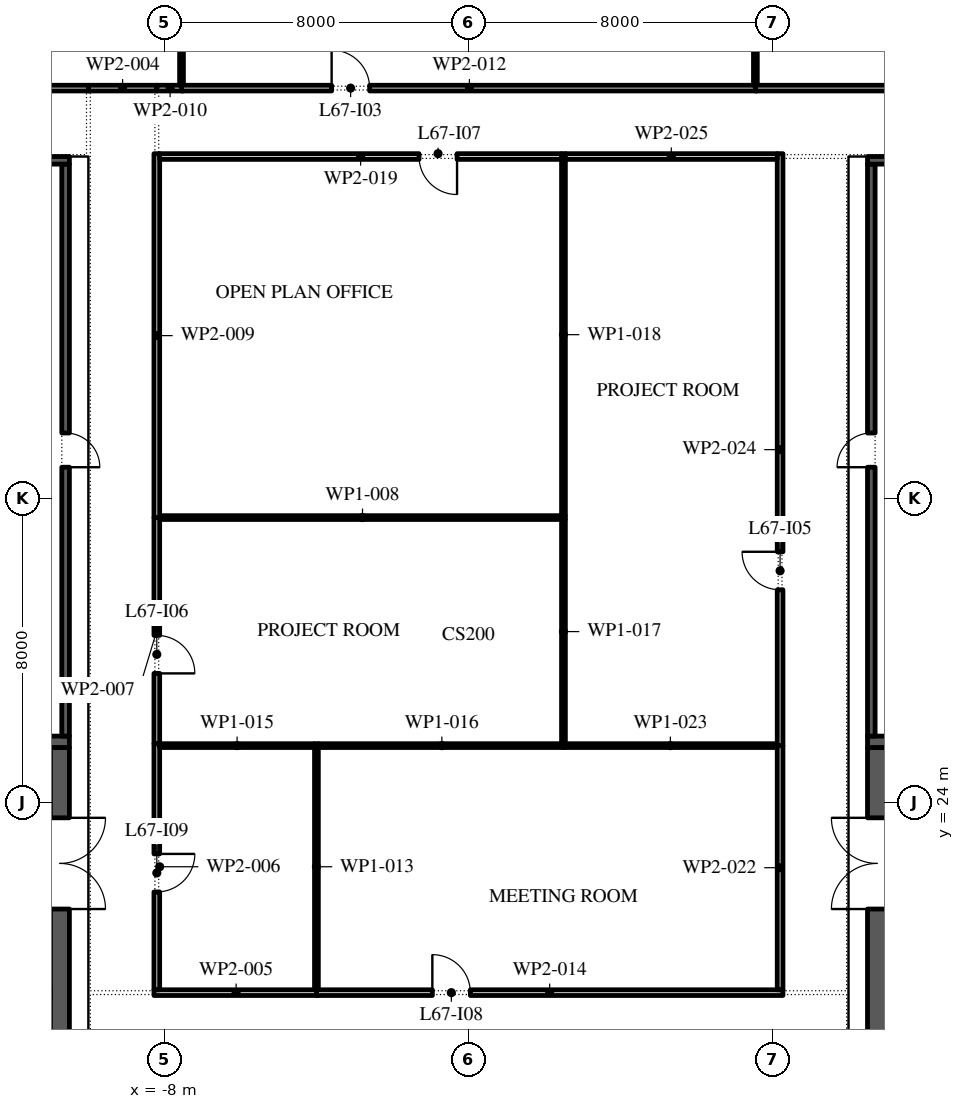
"""IFC4 building model, lengths in metres.
Left out: names, types, materials, properties, quantities, classifications, styles, units other than length and angle.
Written with IfcOpenShell. Run it as: python <this file> out.ifc"""

import sys

from ifc_helpers import new_model, si_unit, direction, frame, frame_2d, origin, place, context, subcontext, project, spatial, rectangle, extrude, element, fill, save


model = new_model("IFC4")
c1 = context("Model", 3, precision=1e-05, world=origin(), true_north=direction((0.0, 1.0)))
c2 = subcontext(c1, "Body", "Model", "MODEL_VIEW")
j1 = project(units=[si_unit("LENGTHUNIT", "METRE"), si_unit("PLANEANGLEUNIT", "RADIAN")], contexts=[c1])
p1 = place(None, origin())
s1 = spatial("IfcSite", under=j1, at=p1, CompositionType="ELEMENT")
p2 = place(p1, origin())
s2 = spatial("IfcBuilding", under=s1, at=p2, CompositionType="ELEMENT")
p3 = place(p2, frame((0.0, 0.0, 309.0)))
s3 = spatial("IfcBuildingStorey", under=s2, at=p3, CompositionType="ELEMENT", Elevation=309.0)
p4 = place(p3, frame((-10.75, -2.45, 0.0), z_axis=(0.0, 0.0, 1.0), x_axis=(0.0, 1.0, 0.0)))
e1 = element("IfcWall", 1, at=p4, inside=s3, PredefinedType="SHEAR", context=c2, shape_type="SweptSolid", body=[
    extrude(rectangle(XDim=27.9, YDim=0.5, at=frame_2d((13.95, 0.0))), origin(), (0.0, 0.0, 1.0), 4.0),
])
p5 = place(p4, frame((23.65, 0.0, 0.0)))
e2 = element("IfcOpeningElement", 2, at=p5, cuts=e1, PredefinedType="OPENING", context=c2, shape_type="SweptSolid", body=[
    extrude(rectangle(XDim=2.4, YDim=2.1, at=frame_2d((1.2, 1.05))), frame((0.0, 0.26, 0.0), z_axis=(0.0, -1.0, 0.0), x_axis=(1.0, 0.0, 0.0)), (0.0, 0.0, 1.0), 0.52),
])
p6 = place(p4, frame((0.788, 0.0, 0.0)))
e3 = element("IfcOpeningElement", 3, at=p6, cuts=e1, PredefinedType="OPENING", context=c2, shape_type="SweptSolid", body=[
    extrude(rectangle(XDim=0.9, YDim=2.1, at=frame_2d((0.45, 1.05))), frame((0.0, 0.26, 0.0), z_axis=(0.0, -1.0, 0.0), x_axis=(1.0, 0.0, 0.0)), (0.0, 0.0, 1.0), 0.52),
])
p7 = place(p4, frame((3.962, 0.0, 0.0)))
e4 = element("IfcOpeningElement", 4, at=p7, cuts=e1, PredefinedType="OPENING", context=c2, shape_type="SweptSolid", body=[
    extrude(rectangle(XDim=1.0, YDim=2.1, at=frame_2d((0.5, 1.05))), frame((0.0, 0.26, 0.0), z_axis=(0.0, -1.0, 0.0), x_axis=(1.0, 0.0, 0.0)), (0.0, 0.0, 1.0), 0.52),
])
p8 = place(p3, frame((-21.5, 25.6, 0.0), z_axis=(0.0, 0.0, 1.0), x_axis=(1.0, 0.0, 0.0)))
e5 = element("IfcWall", 5, at=p8, inside=s3, PredefinedType="SHEAR", context=c2, shape_type="SweptSolid", body=[
    extrude(rectangle(XDim=11.0, YDim=0.3, at=frame_2d((5.5, 0.0))), origin(), (0.0, 0.0, 1.0), 4.0),
])
p9 = place(p3, frame((-10.6, 25.75, 0.0), z_axis=(0.0, 0.0, 1.0), x_axis=(0.0, 1.0, 0.0)))
e6 = element("IfcWall", 6, at=p9, inside=s3, PredefinedType="SHEAR", context=c2, shape_type="SweptSolid", body=[
    extrude(rectangle(XDim=15.05, YDim=0.2, at=frame_2d((7.525, 0.0))), origin(), (0.0, 0.0, 1.0), 4.0),
])
p10 = place(p9, frame((7.075, 0.0, 0.0)))
e7 = element("IfcOpeningElement", 7, at=p10, cuts=e6, PredefinedType="OPENING", context=c2, shape_type="SweptSolid", body=[
    extrude(rectangle(XDim=0.9, YDim=2.1, at=frame_2d((0.45, 1.05))), frame((0.0, 0.11, 0.0), z_axis=(0.0, -1.0, 0.0), x_axis=(1.0, 0.0, 0.0)), (0.0, 0.0, 1.0), 0.22),
])
p11 = place(p3, frame((-21.5, 40.9, 0.0), z_axis=(0.0, 0.0, 1.0), x_axis=(1.0, 0.0, 0.0)))
e8 = element("IfcWall", 8, at=p11, inside=s3, PredefinedType="SHEAR", context=c2, shape_type="SweptSolid", body=[
    extrude(rectangle(XDim=11.0, YDim=0.2, at=frame_2d((5.5, 0.0))), origin(), (0.0, 0.0, 1.0), 4.0),
])
p12 = place(p3, frame((10.75, -2.45, 0.0), z_axis=(0.0, 0.0, 1.0), x_axis=(0.0, 1.0, 0.0)))
e9 = element("IfcWall", 9, at=p12, inside=s3, PredefinedType="SHEAR", context=c2, shape_type="SweptSolid", body=[
    extrude(rectangle(XDim=27.9, YDim=0.5, at=frame_2d((13.95, 0.0))), origin(), (0.0, 0.0, 1.0), 4.0),
])
p13 = place(p12, frame((23.65, 0.0, 0.0)))
e10 = element("IfcOpeningElement", 10, at=p13, cuts=e9, PredefinedType="OPENING", context=c2, shape_type="SweptSolid", body=[
    extrude(rectangle(XDim=2.4, YDim=2.1, at=frame_2d((1.2, 1.05))), frame((0.0, 0.26, 0.0), z_axis=(0.0, -1.0, 0.0), x_axis=(1.0, 0.0, 0.0)), (0.0, 0.0, 1.0), 0.52),
])
p14 = place(p12, frame((1.387, 0.0, 0.0)))
e11 = element("IfcOpeningElement", 11, at=p14, cuts=e9, PredefinedType="OPENING", context=c2, shape_type="SweptSolid", body=[
    extrude(rectangle(XDim=0.9, YDim=2.1, at=frame_2d((0.45, 1.05))), frame((0.0, 0.26, 0.0), z_axis=(0.0, -1.0, 0.0), x_axis=(1.0, 0.0, 0.0)), (0.0, 0.0, 1.0), 0.52),
])
p15 = place(p12, frame((4.562, 0.0, 0.0)))
e12 = element("IfcOpeningElement", 12, at=p15, cuts=e9, PredefinedType="OPENING", context=c2, shape_type="SweptSolid", body=[
    extrude(rectangle(XDim=1.0, YDim=2.1, at=frame_2d((0.5, 1.05))), frame((0.0, 0.26, 0.0), z_axis=(0.0, -1.0, 0.0), x_axis=(1.0, 0.0, 0.0)), (0.0, 0.0, 1.0), 0.52),
])
p16 = place(p3, frame((10.5, 25.6, 0.0), z_axis=(0.0, 0.0, 1.0), x_axis=(1.0, 0.0, 0.0)))
e13 = element("IfcWall", 13, at=p16, inside=s3, PredefinedType="SHEAR", context=c2, shape_type="SweptSolid", body=[
    extrude(rectangle(XDim=11.0, YDim=0.3, at=frame_2d((5.5, 0.0))), origin(), (0.0, 0.0, 1.0), 4.0),
])
p17 = place(p3, frame((10.6, 25.75, 0.0), z_axis=(0.0, 0.0, 1.0), x_axis=(0.0, 1.0, 0.0)))
e14 = element("IfcWall", 14, at=p17, inside=s3, PredefinedType="SHEAR", context=c2, shape_type="SweptSolid", body=[
    extrude(rectangle(XDim=15.05, YDim=0.2, at=frame_2d((7.525, 0.0))), origin(), (0.0, 0.0, 1.0), 4.0),
])
p18 = place(p17, frame((7.075, 0.0, 0.0)))
e15 = element("IfcOpeningElement", 15, at=p18, cuts=e14, PredefinedType="OPENING", context=c2, shape_type="SweptSolid", body=[
    extrude(rectangle(XDim=0.9, YDim=2.1, at=frame_2d((0.45, 1.05))), frame((0.0, 0.11, 0.0), z_axis=(0.0, -1.0, 0.0), x_axis=(1.0, 0.0, 0.0)), (0.0, 0.0, 1.0), 0.22),
])
p19 = place(p3, frame((10.5, 40.9, 0.0), z_axis=(0.0, 0.0, 1.0), x_axis=(1.0, 0.0, 0.0)))
e16 = element("IfcWall", 16, at=p19, inside=s3, PredefinedType="SHEAR", context=c2, shape_type="SweptSolid", body=[
    extrude(rectangle(XDim=11.0, YDim=0.2, at=frame_2d((5.5, 0.0))), origin(), (0.0, 0.0, 1.0), 4.0),
])
p20 = place(p3, frame((-26.05, 42.8, 0.0), z_axis=(0.0, 0.0, 1.0), x_axis=(1.0, 0.0, 0.0)))
e17 = element("IfcWall", 17, at=p20, inside=s3, PredefinedType="PARTITIONING", context=c2, shape_type="SweptSolid", body=[
    extrude(rectangle(XDim=16.05, YDim=0.15, at=frame_2d((8.025, 0.0))), origin(), (0.0, 0.0, 1.0), 4.0),
])
p21 = place(p20, frame((4.15, 0.0, 0.0)))
e18 = element("IfcOpeningElement", 18, at=p21, cuts=e17, PredefinedType="OPENING", context=c2, shape_type="SweptSolid", body=[
    extrude(rectangle(XDim=1.0, YDim=2.1, at=frame_2d((0.5, 1.05))), frame((0.0, 0.085, 0.0), z_axis=(0.0, -1.0, 0.0), x_axis=(1.0, 0.0, 0.0)), (0.0, 0.0, 1.0), 0.17),
])
p22 = place(p3, frame((-10.0, 42.8, 0.0), z_axis=(0.0, 0.0, 1.0), x_axis=(1.0, 0.0, 0.0)))
e19 = element("IfcWall", 19, at=p22, inside=s3, PredefinedType="PARTITIONING", context=c2, shape_type="SweptSolid", body=[
    extrude(rectangle(XDim=1.8, YDim=0.15, at=frame_2d((0.9, 0.0))), origin(), (0.0, 0.0, 1.0), 4.0),
])
p23 = place(p3, frame((-8.275, 19.0, 0.0), z_axis=(0.0, 0.0, 1.0), x_axis=(1.0, 0.0, 0.0)))
e20 = element("IfcWall", 20, at=p23, inside=s3, PredefinedType="PARTITIONING", context=c2, shape_type="SweptSolid", body=[
    extrude(rectangle(XDim=4.325, YDim=0.15, at=frame_2d((2.163, 0.0))), origin(), (0.0, 0.0, 1.0), 4.0),
])
p24 = place(p3, frame((-8.2, 25.55, 0.0), z_axis=(0.0, 0.0, 1.0), x_axis=(0.0, -1.0, 0.0)))
e21 = element("IfcWall", 21, at=p24, inside=s3, PredefinedType="PARTITIONING", context=c2, shape_type="SweptSolid", body=[
    extrude(rectangle(XDim=6.475, YDim=0.15, at=frame_2d((3.238, 0.0))), origin(), (0.0, 0.0, 1.0), 4.0),
])
p25 = place(p24, frame((2.9, 0.0, 0.0)))
e22 = element("IfcOpeningElement", 22, at=p25, cuts=e21, PredefinedType="OPENING", context=c2, shape_type="SweptSolid", body=[
    extrude(rectangle(XDim=1.0, YDim=2.1, at=frame_2d((0.5, 1.05))), frame((0.0, 0.085, 0.0), z_axis=(0.0, -1.0, 0.0), x_axis=(1.0, 0.0, 0.0)), (0.0, 0.0, 1.0), 0.17),
])
p26 = place(p3, frame((-8.2, 31.5, 0.0), z_axis=(0.0, 0.0, 1.0), x_axis=(0.0, -1.0, 0.0)))
e23 = element("IfcWall", 23, at=p26, inside=s3, PredefinedType="PARTITIONING", context=c2, shape_type="SweptSolid", body=[
    extrude(rectangle(XDim=5.95, YDim=0.15, at=frame_2d((2.975, 0.0))), origin(), (0.0, 0.0, 1.0), 4.0),
])
p27 = place(p26, frame((3.1, 0.0, 0.0)))
e24 = element("IfcOpeningElement", 24, at=p27, cuts=e23, PredefinedType="OPENING", context=c2, shape_type="SweptSolid", body=[
    extrude(rectangle(XDim=1.0, YDim=2.1, at=frame_2d((0.5, 1.05))), frame((0.0, 0.085, 0.0), z_axis=(0.0, -1.0, 0.0), x_axis=(1.0, 0.0, 0.0)), (0.0, 0.0, 1.0), 0.17),
])
p28 = place(p3, frame((-8.125, 31.5, 0.0), z_axis=(0.0, 0.0, 1.0), x_axis=(1.0, 0.0, 0.0)))
e25 = element("IfcWall", 25, at=p28, inside=s3, PredefinedType="PARTITIONING", context=c2, shape_type="SweptSolid", body=[
    extrude(rectangle(XDim=10.675, YDim=0.1, at=frame_2d((5.337, 0.0))), origin(), (0.0, 0.0, 1.0), 4.0),
])
p29 = place(p3, frame((-8.2, 41.075, 0.0), z_axis=(0.0, 0.0, 1.0), x_axis=(0.0, -1.0, 0.0)))
e26 = element("IfcWall", 26, at=p29, inside=s3, PredefinedType="PARTITIONING", context=c2, shape_type="SweptSolid", body=[
    extrude(rectangle(XDim=9.575, YDim=0.15, at=frame_2d((4.788, 0.0))), origin(), (0.0, 0.0, 1.0), 4.0),
])
p30 = place(p3, frame((-8.2, 42.8, 0.0), z_axis=(0.0, 0.0, 1.0), x_axis=(1.0, 0.0, 0.0)))
e27 = element("IfcWall", 27, at=p30, inside=s3, PredefinedType="PARTITIONING", context=c2, shape_type="SweptSolid", body=[
    extrude(rectangle(XDim=0.7, YDim=0.15, at=frame_2d((0.35, 0.0))), origin(), (0.0, 0.0, 1.0), 4.0),
])
p31 = place(p3, frame((-7.55, 42.875, 0.0), z_axis=(0.0, 0.0, 1.0), x_axis=(0.0, 1.0, 0.0)))
e28 = element("IfcWall", 28, at=p31, inside=s3, PredefinedType="PARTITIONING", context=c2, shape_type="SweptSolid", body=[
    extrude(rectangle(XDim=9.925, YDim=0.1, at=frame_2d((4.962, 0.0))), origin(), (0.0, 0.0, 1.0), 4.0),
])
p32 = place(p3, frame((-7.55, 42.8, 0.0), z_axis=(0.0, 0.0, 1.0), x_axis=(1.0, 0.0, 0.0)))
e29 = element("IfcWall", 29, at=p32, inside=s3, PredefinedType="PARTITIONING", context=c2, shape_type="SweptSolid", body=[
    extrude(rectangle(XDim=15.15, YDim=0.15, at=frame_2d((7.575, 0.0))), origin(), (0.0, 0.0, 1.0), 4.0),
])
p33 = place(p32, frame((3.95, 0.0, 0.0)))
e30 = element("IfcOpeningElement", 30, at=p33, cuts=e29, PredefinedType="OPENING", context=c2, shape_type="SweptSolid", body=[
    extrude(rectangle(XDim=1.0, YDim=2.1, at=frame_2d((0.5, 1.05))), frame((0.0, 0.085, 0.0), z_axis=(0.0, -1.0, 0.0), x_axis=(1.0, 0.0, 0.0)), (0.0, 0.0, 1.0), 0.17),
])
p34 = place(p3, frame((-4.0, 19.075, 0.0), z_axis=(0.0, 0.0, 1.0), x_axis=(0.0, 1.0, 0.0)))
e31 = element("IfcWall", 31, at=p34, inside=s3, PredefinedType="PARTITIONING", context=c2, shape_type="SweptSolid", body=[
    extrude(rectangle(XDim=6.475, YDim=0.1, at=frame_2d((3.238, 0.0))), origin(), (0.0, 0.0, 1.0), 4.0),
])
p35 = place(p3, frame((-4.0, 19.0, 0.0), z_axis=(0.0, 0.0, 1.0), x_axis=(1.0, 0.0, 0.0)))
e32 = element("IfcWall", 32, at=p35, inside=s3, PredefinedType="PARTITIONING", context=c2, shape_type="SweptSolid", body=[
    extrude(rectangle(XDim=12.275, YDim=0.15, at=frame_2d((6.137, 0.0))), origin(), (0.0, 0.0, 1.0), 4.0),
])
p36 = place(p35, frame((3.05, 0.0, 0.0)))
e33 = element("IfcOpeningElement", 33, at=p36, cuts=e32, PredefinedType="OPENING", context=c2, shape_type="SweptSolid", body=[
    extrude(rectangle(XDim=1.0, YDim=2.1, at=frame_2d((0.5, 1.05))), frame((0.0, 0.085, 0.0), z_axis=(0.0, -1.0, 0.0), x_axis=(1.0, 0.0, 0.0)), (0.0, 0.0, 1.0), 0.17),
])
p37 = place(p3, frame((-4.05, 25.5, 0.0), z_axis=(0.0, 0.0, 1.0), x_axis=(-1.0, 0.0, 0.0)))
e34 = element("IfcWall", 34, at=p37, inside=s3, PredefinedType="PARTITIONING", context=c2, shape_type="SweptSolid", body=[
    extrude(rectangle(XDim=4.075, YDim=0.1, at=frame_2d((2.038, 0.0))), origin(), (0.0, 0.0, 1.0), 4.0),
])
p38 = place(p3, frame((2.55, 25.5, 0.0), z_axis=(0.0, 0.0, 1.0), x_axis=(-1.0, 0.0, 0.0)))
e35 = element("IfcWall", 35, at=p38, inside=s3, PredefinedType="PARTITIONING", context=c2, shape_type="SweptSolid", body=[
    extrude(rectangle(XDim=6.5, YDim=0.1, at=frame_2d((3.25, 0.0))), origin(), (0.0, 0.0, 1.0), 4.0),
])
p39 = place(p3, frame((2.5, 25.55, 0.0), z_axis=(0.0, 0.0, 1.0), x_axis=(0.0, 1.0, 0.0)))
e36 = element("IfcWall", 36, at=p39, inside=s3, PredefinedType="PARTITIONING", context=c2, shape_type="SweptSolid", body=[
    extrude(rectangle(XDim=5.9, YDim=0.1, at=frame_2d((2.95, 0.0))), origin(), (0.0, 0.0, 1.0), 4.0),
])
p40 = place(p3, frame((2.5, 31.55, 0.0), z_axis=(0.0, 0.0, 1.0), x_axis=(0.0, 1.0, 0.0)))
e37 = element("IfcWall", 37, at=p40, inside=s3, PredefinedType="PARTITIONING", context=c2, shape_type="SweptSolid", body=[
    extrude(rectangle(XDim=9.525, YDim=0.1, at=frame_2d((4.762, 0.0))), origin(), (0.0, 0.0, 1.0), 4.0),
])
p41 = place(p3, frame((2.45, 41.0, 0.0), z_axis=(0.0, 0.0, 1.0), x_axis=(-1.0, 0.0, 0.0)))
e38 = element("IfcWall", 38, at=p41, inside=s3, PredefinedType="PARTITIONING", context=c2, shape_type="SweptSolid", body=[
    extrude(rectangle(XDim=10.575, YDim=0.15, at=frame_2d((5.288, 0.0))), origin(), (0.0, 0.0, 1.0), 4.0),
])
p42 = place(p41, frame((2.75, 0.0, 0.0)))
e39 = element("IfcOpeningElement", 39, at=p42, cuts=e38, PredefinedType="OPENING", context=c2, shape_type="SweptSolid", body=[
    extrude(rectangle(XDim=1.0, YDim=2.1, at=frame_2d((0.5, 1.05))), frame((0.0, 0.085, 0.0), z_axis=(0.0, -1.0, 0.0), x_axis=(1.0, 0.0, 0.0)), (0.0, 0.0, 1.0), 0.17),
])
p43 = place(p3, frame((7.55, 42.875, 0.0), z_axis=(0.0, 0.0, 1.0), x_axis=(0.0, 1.0, 0.0)))
e40 = element("IfcWall", 40, at=p43, inside=s3, PredefinedType="PARTITIONING", context=c2, shape_type="SweptSolid", body=[
    extrude(rectangle(XDim=9.925, YDim=0.1, at=frame_2d((4.962, 0.0))), origin(), (0.0, 0.0, 1.0), 4.0),
])
p44 = place(p3, frame((7.55, 42.8, 0.0), z_axis=(0.0, 0.0, 1.0), x_axis=(1.0, 0.0, 0.0)))
e41 = element("IfcWall", 41, at=p44, inside=s3, PredefinedType="PARTITIONING", context=c2, shape_type="SweptSolid", body=[
    extrude(rectangle(XDim=15.15, YDim=0.15, at=frame_2d((7.575, 0.0))), origin(), (0.0, 0.0, 1.0), 4.0),
])
p45 = place(p44, frame((8.45, 0.0, 0.0)))
e42 = element("IfcOpeningElement", 42, at=p45, cuts=e41, PredefinedType="OPENING", context=c2, shape_type="SweptSolid", body=[
    extrude(rectangle(XDim=1.0, YDim=2.1, at=frame_2d((0.5, 1.05))), frame((0.0, 0.085, 0.0), z_axis=(0.0, -1.0, 0.0), x_axis=(1.0, 0.0, 0.0)), (0.0, 0.0, 1.0), 0.17),
])
p46 = place(p3, frame((8.2, 19.075, 0.0), z_axis=(0.0, 0.0, 1.0), x_axis=(0.0, 1.0, 0.0)))
e43 = element("IfcWall", 43, at=p46, inside=s3, PredefinedType="PARTITIONING", context=c2, shape_type="SweptSolid", body=[
    extrude(rectangle(XDim=6.425, YDim=0.15, at=frame_2d((3.212, 0.0))), origin(), (0.0, 0.0, 1.0), 4.0),
])
p47 = place(p3, frame((8.125, 25.5, 0.0), z_axis=(0.0, 0.0, 1.0), x_axis=(-1.0, 0.0, 0.0)))
e44 = element("IfcWall", 44, at=p47, inside=s3, PredefinedType="PARTITIONING", context=c2, shape_type="SweptSolid", body=[
    extrude(rectangle(XDim=5.625, YDim=0.1, at=frame_2d((2.812, 0.0))), origin(), (0.0, 0.0, 1.0), 4.0),
])
p48 = place(p3, frame((8.2, 25.5, 0.0), z_axis=(0.0, 0.0, 1.0), x_axis=(0.0, 1.0, 0.0)))
e45 = element("IfcWall", 45, at=p48, inside=s3, PredefinedType="PARTITIONING", context=c2, shape_type="SweptSolid", body=[
    extrude(rectangle(XDim=15.575, YDim=0.15, at=frame_2d((7.788, 0.0))), origin(), (0.0, 0.0, 1.0), 4.0),
])
p49 = place(p48, frame((4.1, 0.0, 0.0)))
e46 = element("IfcOpeningElement", 46, at=p49, cuts=e45, PredefinedType="OPENING", context=c2, shape_type="SweptSolid", body=[
    extrude(rectangle(XDim=1.0, YDim=2.1, at=frame_2d((0.5, 1.05))), frame((0.0, 0.085, 0.0), z_axis=(0.0, -1.0, 0.0), x_axis=(1.0, 0.0, 0.0)), (0.0, 0.0, 1.0), 0.17),
])
p50 = place(p3, frame((8.125, 41.0, 0.0), z_axis=(0.0, 0.0, 1.0), x_axis=(-1.0, 0.0, 0.0)))
e47 = element("IfcWall", 47, at=p50, inside=s3, PredefinedType="PARTITIONING", context=c2, shape_type="SweptSolid", body=[
    extrude(rectangle(XDim=5.575, YDim=0.15, at=frame_2d((2.788, 0.0))), origin(), (0.0, 0.0, 1.0), 4.0),
])
p51 = place(p5, frame((2.4, 0.0, 0.0), z_axis=(0.0, 0.0, 1.0), x_axis=(-1.0, 0.0, 0.0)))
e48 = element("IfcDoor", 48, at=p51, inside=s3, OperationType="DOUBLE_DOOR_SINGLE_SWING", PredefinedType="DOOR", context=c2, shape_type="SweptSolid", body=[
    extrude(rectangle(XDim=2.4, YDim=2.1, at=frame_2d((1.2, 1.05))), frame((0.0, 0.025, 0.0), z_axis=(0.0, -1.0, 0.0), x_axis=(1.0, 0.0, 0.0)), (0.0, 0.0, 1.0), 0.05),
])
fill(e2, e48)
p52 = place(p10, frame((0.9, 0.15, 0.0), z_axis=(0.0, 0.0, 1.0), x_axis=(-1.0, 0.0, 0.0)))
e49 = element("IfcDoor", 49, at=p52, inside=s3, OperationType="SINGLE_SWING_LEFT", PredefinedType="DOOR", context=c2, shape_type="SweptSolid", body=[
    extrude(rectangle(XDim=0.9, YDim=2.1, at=frame_2d((0.45, 1.05))), frame((0.0, 0.1, 0.0), z_axis=(0.0, -1.0, 0.0), x_axis=(1.0, 0.0, 0.0)), (0.0, 0.0, 1.0), 0.05),
])
fill(e7, e49)
p53 = place(p13, origin())
e50 = element("IfcDoor", 50, at=p53, inside=s3, OperationType="DOUBLE_DOOR_SINGLE_SWING", PredefinedType="DOOR", context=c2, shape_type="SweptSolid", body=[
    extrude(rectangle(XDim=2.4, YDim=2.1, at=frame_2d((1.2, 1.05))), frame((0.0, 0.025, 0.0), z_axis=(0.0, -1.0, 0.0), x_axis=(1.0, 0.0, 0.0)), (0.0, 0.0, 1.0), 0.05),
])
fill(e10, e50)
p54 = place(p18, origin())
e51 = element("IfcDoor", 51, at=p54, inside=s3, OperationType="SINGLE_SWING_RIGHT", PredefinedType="DOOR", context=c2, shape_type="SweptSolid", body=[
    extrude(rectangle(XDim=0.9, YDim=2.1, at=frame_2d((0.45, 1.05))), frame((0.0, -0.05, 0.0), z_axis=(0.0, -1.0, 0.0), x_axis=(1.0, 0.0, 0.0)), (0.0, 0.0, 1.0), 0.05),
])
fill(e15, e51)
p55 = place(p33, origin())
e52 = element("IfcDoor", 52, at=p55, inside=s3, OperationType="SINGLE_SWING_RIGHT", PredefinedType="DOOR", context=c2, shape_type="SweptSolid", body=[
    extrude(rectangle(XDim=1.0, YDim=2.1, at=frame_2d((0.5, 1.05))), frame((0.0, 0.025, 0.0), z_axis=(0.0, -1.0, 0.0), x_axis=(1.0, 0.0, 0.0)), (0.0, 0.0, 1.0), 0.05),
])
fill(e30, e52)
p56 = place(p49, origin())
e53 = element("IfcDoor", 53, at=p56, inside=s3, OperationType="SINGLE_SWING_LEFT", PredefinedType="DOOR", context=c2, shape_type="SweptSolid", body=[
    extrude(rectangle(XDim=1.0, YDim=2.1, at=frame_2d((0.5, 1.05))), frame((0.0, 0.025, 0.0), z_axis=(0.0, -1.0, 0.0), x_axis=(1.0, 0.0, 0.0)), (0.0, 0.0, 1.0), 0.05),
])
fill(e46, e53)
p57 = place(p27, origin())
e54 = element("IfcDoor", 54, at=p57, inside=s3, OperationType="SINGLE_SWING_LEFT", PredefinedType="DOOR", context=c2, shape_type="SweptSolid", body=[
    extrude(rectangle(XDim=1.0, YDim=2.1, at=frame_2d((0.5, 1.05))), frame((0.0, 0.025, 0.0), z_axis=(0.0, -1.0, 0.0), x_axis=(1.0, 0.0, 0.0)), (0.0, 0.0, 1.0), 0.05),
])
fill(e24, e54)
p58 = place(p42, origin())
e55 = element("IfcDoor", 55, at=p58, inside=s3, OperationType="SINGLE_SWING_RIGHT", PredefinedType="DOOR", context=c2, shape_type="SweptSolid", body=[
    extrude(rectangle(XDim=1.0, YDim=2.1, at=frame_2d((0.5, 1.05))), frame((0.0, 0.025, 0.0), z_axis=(0.0, -1.0, 0.0), x_axis=(1.0, 0.0, 0.0)), (0.0, 0.0, 1.0), 0.05),
])
fill(e39, e55)
p59 = place(p36, origin())
e56 = element("IfcDoor", 56, at=p59, inside=s3, OperationType="SINGLE_SWING_RIGHT", PredefinedType="DOOR", context=c2, shape_type="SweptSolid", body=[
    extrude(rectangle(XDim=1.0, YDim=2.1, at=frame_2d((0.5, 1.05))), frame((0.0, 0.025, 0.0), z_axis=(0.0, -1.0, 0.0), x_axis=(1.0, 0.0, 0.0)), (0.0, 0.0, 1.0), 0.05),
])
fill(e33, e56)
p60 = place(p25, origin())
e57 = element("IfcDoor", 57, at=p60, inside=s3, OperationType="SINGLE_SWING_RIGHT", PredefinedType="DOOR", context=c2, shape_type="SweptSolid", body=[
    extrude(rectangle(XDim=1.0, YDim=2.1, at=frame_2d((0.5, 1.05))), frame((0.0, 0.025, 0.0), z_axis=(0.0, -1.0, 0.0), x_axis=(1.0, 0.0, 0.0)), (0.0, 0.0, 1.0), 0.05),
])
fill(e22, e57)
save(model, sys.argv[1])
